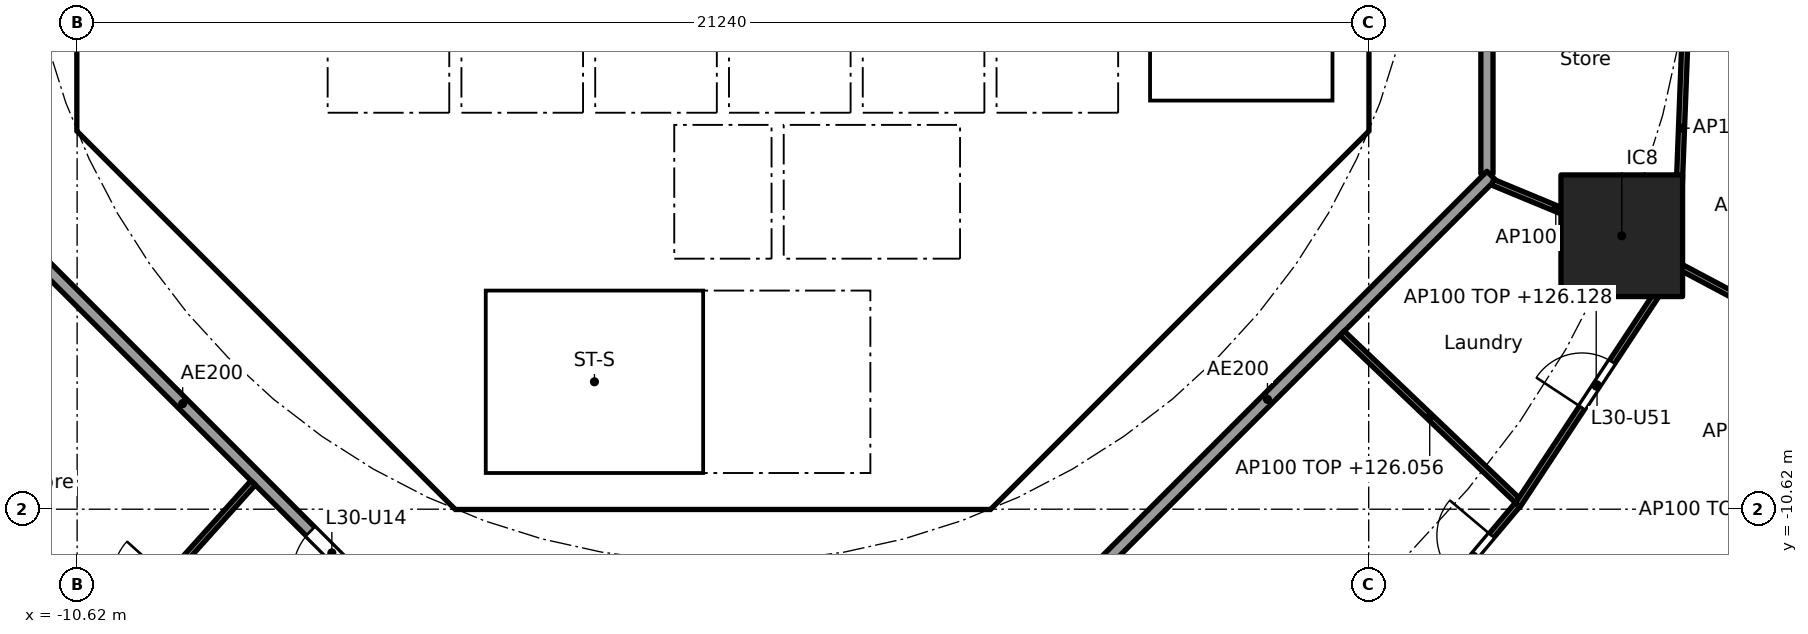
"""IFC4 building model, lengths in metres.
Left out: names, types, materials, properties, quantities, classifications, styles, units other than length and angle.
Written with IfcOpenShell. Run it as: python <this file> out.ifc"""

import sys

from ifc_helpers import new_model, si_unit, direction, frame, frame_2d, origin, origin_2d, place, context, subcontext, project, spatial, polyline, rectangle, outline, extrude, element, fill, save


model = new_model("IFC4")
c1 = context("Model", 3, precision=1e-05, world=origin(), true_north=direction((0.0, 1.0)))
c2 = subcontext(c1, "Body", "Model", "MODEL_VIEW")
j1 = project(units=[si_unit("LENGTHUNIT", "METRE"), si_unit("PLANEANGLEUNIT", "RADIAN")], contexts=[c1])
p1 = place(None, origin())
s1 = spatial("IfcSite", under=j1, at=p1, CompositionType="ELEMENT")
p2 = place(p1, origin())
s2 = spatial("IfcBuilding", under=s1, at=p2, CompositionType="ELEMENT")
p3 = place(p2, frame((0.0, 0.0, 123.3)))
s3 = spatial("IfcBuildingStorey", under=s2, at=p3, CompositionType="ELEMENT", Elevation=123.3)
p4 = place(p3, frame((14.782, -6.123, 0.0), z_axis=(0.0, 0.0, 1.0), x_axis=(1.0, 0.0, 0.0)))
e1 = element("IfcColumn", 1, at=p4, inside=s3, PredefinedType="COLUMN", context=c2, shape_type="SweptSolid", body=[
    extrude(rectangle(XDim=2.0, YDim=2.0, at=origin_2d()), origin(), (0.0, 0.0, 1.0), 3.7),
])
p5 = place(p3, frame((-10.325, 3.801, 0.0), z_axis=(0.0, 0.0, 1.0), x_axis=(0.0, -1.0, 0.0)))
e2 = element("IfcWall", 2, at=p5, inside=s3, PredefinedType="SHEAR", context=c2, shape_type="SweptSolid", body=[
    extrude(rectangle(XDim=7.602, YDim=0.6, at=frame_2d((3.801, 0.0))), origin(), (0.0, 0.0, 1.0), 3.44),
])
p6 = place(p5, frame((0.651, 0.0, 0.0)))
e3 = element("IfcOpeningElement", 3, at=p6, cuts=e2, PredefinedType="OPENING", context=c2, shape_type="SweptSolid", body=[
    extrude(rectangle(XDim=1.5, YDim=2.1, at=frame_2d((0.75, 1.05))), frame((0.0, 0.31, 0.0), z_axis=(0.0, -1.0, 0.0), x_axis=(1.0, 0.0, 0.0)), (0.0, 0.0, 1.0), 0.62),
])
p7 = place(p5, frame((5.451, 0.0, 0.0)))
e4 = element("IfcOpeningElement", 4, at=p7, cuts=e2, PredefinedType="OPENING", context=c2, shape_type="SweptSolid", body=[
    extrude(rectangle(XDim=1.5, YDim=2.1, at=frame_2d((0.75, 1.05))), frame((0.0, 0.31, 0.0), z_axis=(0.0, -1.0, 0.0), x_axis=(1.0, 0.0, 0.0)), (0.0, 0.0, 1.0), 0.62),
])
p8 = place(p3, frame((-9.988, -4.613, 0.0), z_axis=(0.0, 0.0, 1.0), x_axis=(0.707106781187, -0.707106781187, 0.0)))
e5 = element("IfcWall", 5, at=p8, inside=s3, PredefinedType="SHEAR", context=c2, shape_type="SweptSolid", body=[
    extrude(rectangle(XDim=7.602, YDim=0.6, at=frame_2d((3.801, 0.0))), origin(), (0.0, 0.0, 1.0), 3.44),
])
p9 = place(p8, frame((6.151, 0.0, 0.0)))
e6 = element("IfcOpeningElement", 6, at=p9, cuts=e5, PredefinedType="OPENING", context=c2, shape_type="SweptSolid", body=[
    extrude(rectangle(XDim=1.1, YDim=2.1, at=frame_2d((0.55, 1.05))), frame((0.0, 0.31, 0.0), z_axis=(0.0, -1.0, 0.0), x_axis=(1.0, 0.0, 0.0)), (0.0, 0.0, 1.0), 0.62),
])
p10 = place(p3, frame((4.613, -9.988, 0.0), z_axis=(0.0, 0.0, 1.0), x_axis=(0.707106781187, 0.707106781187, 0.0)))
e7 = element("IfcWall", 7, at=p10, inside=s3, PredefinedType="SHEAR", context=c2, shape_type="SweptSolid", body=[
    extrude(rectangle(XDim=7.602, YDim=0.6, at=frame_2d((3.801, 0.0))), origin(), (0.0, 0.0, 1.0), 3.44),
])
p11 = place(p10, frame((3.201, 0.0, 0.0)))
e8 = element("IfcOpeningElement", 8, at=p11, cuts=e7, PredefinedType="OPENING", context=c2, shape_type="SweptSolid", body=[
    extrude(rectangle(XDim=1.2, YDim=2.1, at=frame_2d((0.6, 1.05))), frame((0.0, 0.31, 0.0), z_axis=(0.0, -1.0, 0.0), x_axis=(1.0, 0.0, 0.0)), (0.0, 0.0, 1.0), 0.62),
])
p12 = place(p3, frame((4.0, -10.025, 0.0), z_axis=(0.0, 0.0, 1.0), x_axis=(0.0, 1.0, 0.0)))
e9 = element("IfcWall", 9, at=p12, inside=s3, PredefinedType="SOLIDWALL", context=c2, shape_type="SweptSolid", body=[
    extrude(rectangle(XDim=3.0, YDim=0.2, at=frame_2d((1.5, 0.0))), origin(), (0.0, 0.0, 1.0), 3.44),
])
p13 = place(p12, frame((0.975, 0.0, 0.0)))
e10 = element("IfcOpeningElement", 10, at=p13, cuts=e9, PredefinedType="OPENING", context=c2, shape_type="SweptSolid", body=[
    extrude(rectangle(XDim=1.1, YDim=2.1, at=frame_2d((0.55, 1.05))), frame((0.0, 0.11, 0.0), z_axis=(0.0, -1.0, 0.0), x_axis=(1.0, 0.0, 0.0)), (0.0, 0.0, 1.0), 0.22),
])
p14 = place(p3, frame((-5.8, -8.227, 0.0), z_axis=(0.0, 0.0, 1.0), x_axis=(0.0, 1.0, 0.0)))
e11 = element("IfcWall", 11, at=p14, inside=s3, PredefinedType="PARTITIONING", context=c2, shape_type="SweptSolid", body=[
    extrude(rectangle(XDim=3.927, YDim=0.15, at=frame_2d((1.963, 0.0))), origin(), (0.0, 0.0, 1.0), 3.44),
])
p15 = place(p14, frame((1.476, 0.0, 0.0)))
e12 = element("IfcOpeningElement", 12, at=p15, cuts=e11, PredefinedType="OPENING", context=c2, shape_type="SweptSolid", body=[
    extrude(rectangle(XDim=0.9, YDim=2.1, at=frame_2d((0.45, 1.05))), frame((0.0, 0.085, 0.0), z_axis=(0.0, -1.0, 0.0), x_axis=(1.0, 0.0, 0.0)), (0.0, 0.0, 1.0), 0.17),
])
p16 = place(p3, frame((4.0, -6.5, 0.0), z_axis=(0.0, 0.0, 1.0), x_axis=(0.0, 1.0, 0.0)))
e13 = element("IfcWall", 13, at=p16, inside=s3, PredefinedType="SOLIDWALL", context=c2, shape_type="SweptSolid", body=[
    extrude(rectangle(XDim=2.2, YDim=0.2, at=frame_2d((1.1, 0.0))), origin(), (0.0, 0.0, 1.0), 3.44),
])
p17 = place(p16, frame((0.55, 0.0, 0.0)))
e14 = element("IfcOpeningElement", 14, at=p17, cuts=e13, PredefinedType="OPENING", context=c2, shape_type="SweptSolid", body=[
    extrude(rectangle(XDim=1.1, YDim=2.1, at=frame_2d((0.55, 1.05))), frame((0.0, 0.11, 0.0), z_axis=(0.0, -1.0, 0.0), x_axis=(1.0, 0.0, 0.0)), (0.0, 0.0, 1.0), 0.22),
])
p18 = place(p3, frame((-4.0, -6.5, 0.0), z_axis=(0.0, 0.0, 1.0), x_axis=(0.0, 1.0, 0.0)))
e15 = element("IfcWall", 15, at=p18, inside=s3, PredefinedType="SOLIDWALL", context=c2, shape_type="SweptSolid", body=[
    extrude(rectangle(XDim=2.2, YDim=0.2, at=frame_2d((1.1, 0.0))), origin(), (0.0, 0.0, 1.0), 3.44),
])
p19 = place(p18, frame((0.65, 0.0, 0.0)))
e16 = element("IfcOpeningElement", 16, at=p19, cuts=e15, PredefinedType="OPENING", context=c2, shape_type="SweptSolid", body=[
    extrude(rectangle(XDim=0.9, YDim=2.1, at=frame_2d((0.45, 1.05))), frame((0.0, 0.11, 0.0), z_axis=(0.0, -1.0, 0.0), x_axis=(1.0, 0.0, 0.0)), (0.0, 0.0, 1.0), 0.22),
])
p20 = place(p3, origin())
e17 = element("IfcWall", 17, at=p20, inside=s3, PredefinedType="SHEAR", context=c2, shape_type="SweptSolid", body=[
    extrude(outline(polyline([(-10.625, -3.801), (-10.025, -3.801), (-10.025, -4.152), (-9.776, -4.401), (-10.2, -4.825), (-10.625, -4.401), (-10.625, -3.801)])), origin(), (0.0, 0.0, 1.0), 3.44),
])
p21 = place(p3, origin())
e18 = element("IfcWall", 18, at=p21, inside=s3, PredefinedType="SHEAR", context=c2, shape_type="SweptSolid", body=[
    extrude(outline(polyline([(-4.152, -10.025), (4.152, -10.025), (4.401, -9.776), (4.825, -10.2), (4.401, -10.625), (-4.401, -10.625), (-4.825, -10.2), (-4.401, -9.776), (-4.152, -10.025)])), origin(), (0.0, 0.0, 1.0), 3.44),
])
p22 = place(p3, origin())
e19 = element("IfcWall", 19, at=p22, inside=s3, PredefinedType="SHEAR", context=c2, shape_type="SweptSolid", body=[
    extrude(outline(polyline([(9.776, -4.401), (10.025, -4.152), (10.025, -3.801), (10.025, 4.152), (9.776, 4.401), (10.2, 4.825), (10.625, 4.401), (10.625, -4.401), (10.2, -4.825), (9.776, -4.401)])), origin(), (0.0, 0.0, 1.0), 3.44),
])
for number, where, z_axis, x_axis in (
    (20, (-0.9, -6.5, 0.0), (0.0, 0.0, 1.0), (0.0, 1.0, 0.0)),
    (21, (0.9, -6.5, 0.0), (0.0, 0.0, 1.0), (0.0, 1.0, 0.0)),
):
    element("IfcWall", number, at=place(p3, frame(where, z_axis=z_axis, x_axis=x_axis)), inside=s3, PredefinedType="SOLIDWALL", context=c2, shape_type="SweptSolid", body=[
        extrude(rectangle(XDim=2.2, YDim=0.2, at=frame_2d((1.1, 0.0))), origin(), (0.0, 0.0, 1.0), 3.44),
    ])
p23 = place(p3, origin())
e22 = element("IfcWall", 22, at=p23, inside=s3, PredefinedType="SOLIDWALL", context=c2, shape_type="SweptSolid", body=[
    extrude(outline(polyline([(-6.7, -2.1), (-6.5, -2.1), (-6.5, -4.1), (-4.5, -4.1), (-4.5, -2.1), (-4.3, -2.1), (-4.3, -4.1), (-2.3, -4.1), (-2.3, -2.1), (-2.1, -2.1), (-2.1, -4.1), (-0.1, -4.1), (-0.1, -2.1), (0.1, -2.1), (0.1, -4.1), (2.1, -4.1), (2.1, -2.1), (2.3, -2.1), (2.3, -4.1), (4.3, -4.1), (4.3, -2.1), (4.5, -2.1), (4.5, -4.1), (6.5, -4.1), (6.5, -2.1), (6.7, -2.1), (6.7, -4.3), (-6.7, -4.3), (-6.7, -2.1)])), origin(), (0.0, 0.0, 1.0), 3.44),
])
p24 = place(p3, frame((-10.025, -4.0, 0.0), z_axis=(0.0, 0.0, 1.0), x_axis=(1.0, 0.0, 0.0)))
e23 = element("IfcWall", 23, at=p24, inside=s3, PredefinedType="PARTITIONING", context=c2, shape_type="SweptSolid", body=[
    extrude(rectangle(XDim=3.325, YDim=0.2, at=frame_2d((1.662, 0.0))), origin(), (0.0, 0.0, 1.0), 3.44),
])
p25 = place(p3, origin())
e24 = element("IfcWall", 24, at=p25, inside=s3, PredefinedType="SOLIDWALL", context=c2, shape_type="SweptSolid", body=[
    extrude(outline(polyline([(-3.9, -10.025), (-4.1, -10.025), (-4.1, -7.025), (-3.9, -7.025), (-3.9, -10.025)])), origin(), (0.0, 0.0, 1.0), 3.44),
])
p26 = place(p3, origin())
e25 = element("IfcWall", 25, at=p26, inside=s3, PredefinedType="SOLIDWALL", context=c2, shape_type="SweptSolid", body=[
    extrude(outline(polyline([(4.1, -7.025), (-4.1, -7.025), (-4.1, -6.5), (4.1, -6.5), (4.1, -7.025)])), origin(), (0.0, 0.0, 1.0), 3.44),
])
p27 = place(p3, origin())
e26 = element("IfcWall", 26, at=p27, inside=s3, PredefinedType="SOLIDWALL", context=c2, shape_type="SweptSolid", body=[
    extrude(outline(polyline([(7.025, -3.9), (6.7, -3.9), (6.7, 3.9), (7.025, 3.9), (7.025, -3.9)])), origin(), (0.0, 0.0, 1.0), 3.44),
])
p28 = place(p3, origin())
e27 = element("IfcWall", 27, at=p28, inside=s3, PredefinedType="SOLIDWALL", context=c2, shape_type="SweptSolid", body=[
    extrude(outline(polyline([(10.025, -4.1), (6.7, -4.1), (6.7, -3.9), (10.025, -3.9), (10.025, -4.1)])), origin(), (0.0, 0.0, 1.0), 3.44),
])
p29 = place(p3, frame((12.565, -5.104, 0.0), z_axis=(0.0, 0.0, 1.0), x_axis=(0.0, 1.0, 0.0)))
e28 = element("IfcWall", 28, at=p29, inside=s3, PredefinedType="PARTITIONING", context=c2, shape_type="SweptSolid", body=[
    extrude(rectangle(XDim=10.209, YDim=0.2, at=frame_2d((5.104, 0.0))), origin(), (0.0, 0.0, 1.0), 3.44),
])
p30 = place(p3, frame((-12.635, -5.134, 0.0), z_axis=(0.0, 0.0, 1.0), x_axis=(0.707106781187, -0.707106781187, 0.0)))
e29 = element("IfcWall", 29, at=p30, inside=s3, PredefinedType="PARTITIONING", context=c2, shape_type="SweptSolid", body=[
    extrude(rectangle(XDim=10.609, YDim=0.2, at=frame_2d((5.305, 0.0))), origin(), (0.0, 0.0, 1.0), 3.44),
])
p31 = place(p30, frame((8.274, 0.0, 0.0)))
e30 = element("IfcOpeningElement", 30, at=p31, cuts=e29, PredefinedType="OPENING", context=c2, shape_type="SweptSolid", body=[
    extrude(rectangle(XDim=1.0, YDim=2.1, at=frame_2d((0.5, 1.05))), frame((0.0, 0.11, 0.0), z_axis=(0.0, -1.0, 0.0), x_axis=(1.0, 0.0, 0.0)), (0.0, 0.0, 1.0), 0.22),
])
p32 = place(p3, frame((5.275, -12.494, 0.0), z_axis=(0.0, 0.0, 1.0), x_axis=(0.707106781187, 0.707106781187, 0.0)))
e31 = element("IfcWall", 31, at=p32, inside=s3, PredefinedType="PARTITIONING", context=c2, shape_type="SweptSolid", body=[
    extrude(rectangle(XDim=10.409, YDim=0.2, at=frame_2d((5.205, 0.0))), origin(), (0.0, 0.0, 1.0), 3.44),
])
p33 = place(p3, frame((15.849, -2.158, 0.0), z_axis=(0.0, 0.0, 1.0), x_axis=(-0.038390448414, -0.999262815014, 0.0)))
e32 = element("IfcWall", 32, at=p33, inside=s3, PredefinedType="PARTITIONING", context=c2, shape_type="SweptSolid", body=[
    extrude(rectangle(XDim=4.394, YDim=0.1, at=frame_2d((2.197, 0.0))), origin(), (0.0, 0.0, 1.0), 3.44),
])
p34 = place(p3, frame((-7.725, -10.186, 0.0), z_axis=(0.0, 0.0, 1.0), x_axis=(-0.668498346565, -0.743713628112, 0.0)))
e33 = element("IfcWall", 33, at=p34, inside=s3, PredefinedType="PARTITIONING", context=c2, shape_type="SweptSolid", body=[
    extrude(rectangle(XDim=11.919, YDim=0.1, at=frame_2d((5.959, 0.0))), origin(), (0.0, 0.0, 1.0), 2.756),
])
p35 = place(p34, frame((2.106, 0.0, 0.0)))
e34 = element("IfcOpeningElement", 34, at=p35, cuts=e33, PredefinedType="OPENING", context=c2, shape_type="SweptSolid", body=[
    extrude(rectangle(XDim=0.9, YDim=2.1, at=frame_2d((0.45, 1.05))), frame((0.0, 0.06, 0.0), z_axis=(0.0, -1.0, 0.0), x_axis=(1.0, 0.0, 0.0)), (0.0, 0.0, 1.0), 0.12),
])
p36 = place(p34, frame((8.041, 0.0, 0.0)))
e35 = element("IfcOpeningElement", 35, at=p36, cuts=e33, PredefinedType="OPENING", context=c2, shape_type="SweptSolid", body=[
    extrude(rectangle(XDim=0.9, YDim=2.1, at=frame_2d((0.45, 1.05))), frame((0.0, 0.06, 0.0), z_axis=(0.0, -1.0, 0.0), x_axis=(1.0, 0.0, 0.0)), (0.0, 0.0, 1.0), 0.12),
])
p37 = place(p3, frame((10.138, -14.026, 0.0), z_axis=(0.0, 0.0, 1.0), x_axis=(0.644051444483, 0.764982180746, 0.0)))
e36 = element("IfcWall", 36, at=p37, inside=s3, PredefinedType="PARTITIONING", context=c2, shape_type="SweptSolid", body=[
    extrude(rectangle(XDim=4.548, YDim=0.1, at=frame_2d((2.274, 0.0))), origin(), (0.0, 0.0, 1.0), 2.828),
])
p38 = place(p37, frame((2.986, 0.0, 0.0)))
e37 = element("IfcOpeningElement", 37, at=p38, cuts=e36, PredefinedType="OPENING", context=c2, shape_type="SweptSolid", body=[
    extrude(rectangle(XDim=0.9, YDim=2.1, at=frame_2d((0.45, 1.05))), frame((0.0, 0.06, 0.0), z_axis=(0.0, -1.0, 0.0), x_axis=(1.0, 0.0, 0.0)), (0.0, 0.0, 1.0), 0.12),
])
p39 = place(p3, frame((10.184, -7.727, 0.0), z_axis=(0.0, 0.0, 1.0), x_axis=(0.723654892782, -0.690162007179, 0.0)))
e38 = element("IfcWall", 38, at=p39, inside=s3, PredefinedType="PARTITIONING", context=c2, shape_type="SweptSolid", body=[
    extrude(rectangle(XDim=3.98, YDim=0.1, at=frame_2d((1.99, 0.0))), origin(), (0.0, 0.0, 1.0), 2.756),
])
p40 = place(p3, frame((13.072, -10.55, 0.0), z_axis=(0.0, 0.0, 1.0), x_axis=(0.550614843759, 0.834759422727, 0.0)))
e39 = element("IfcWall", 39, at=p40, inside=s3, PredefinedType="PARTITIONING", context=c2, shape_type="SweptSolid", body=[
    extrude(rectangle(XDim=4.683, YDim=0.1, at=frame_2d((2.341, 0.0))), origin(), (0.0, 0.0, 1.0), 2.828),
])
p41 = place(p40, frame((1.917, 0.0, 0.0)))
e40 = element("IfcOpeningElement", 40, at=p41, cuts=e39, PredefinedType="OPENING", context=c2, shape_type="SweptSolid", body=[
    extrude(rectangle(XDim=0.9, YDim=2.1, at=frame_2d((0.45, 1.05))), frame((0.0, 0.06, 0.0), z_axis=(0.0, -1.0, 0.0), x_axis=(1.0, 0.0, 0.0)), (0.0, 0.0, 1.0), 0.12),
])
p42 = place(p3, frame((12.657, -5.243, 0.0), z_axis=(0.0, 0.0, 1.0), x_axis=(0.923864733477, -0.382719158442, 0.0)))
e41 = element("IfcWall", 41, at=p42, inside=s3, PredefinedType="PARTITIONING", context=c2, shape_type="SweptSolid", body=[
    extrude(rectangle(XDim=2.25, YDim=0.1, at=frame_2d((1.125, 0.0))), origin(), (0.0, 0.0, 1.0), 3.44),
])
p43 = place(p3, frame((14.826, -6.146, 0.0), z_axis=(0.0, 0.0, 1.0), x_axis=(0.883012998471, -0.469348532044, 0.0)))
e42 = element("IfcWall", 42, at=p43, inside=s3, PredefinedType="PARTITIONING", context=c2, shape_type="SweptSolid", body=[
    extrude(rectangle(XDim=9.172, YDim=0.1, at=frame_2d((4.586, 0.0))), origin(), (0.0, 0.0, 1.0), 2.828),
])
p44 = place(p43, frame((2.728, 0.0, 0.0)))
e43 = element("IfcOpeningElement", 43, at=p44, cuts=e42, PredefinedType="OPENING", context=c2, shape_type="SweptSolid", body=[
    extrude(rectangle(XDim=0.9, YDim=2.1, at=frame_2d((0.45, 1.05))), frame((0.0, 0.06, 0.0), z_axis=(0.0, -1.0, 0.0), x_axis=(1.0, 0.0, 0.0)), (0.0, 0.0, 1.0), 0.12),
])
p45 = place(p17, origin())
e44 = element("IfcDoor", 44, at=p45, inside=s3, OperationType="DOUBLE_DOOR_SLIDING", PredefinedType="DOOR", context=c2, shape_type="SweptSolid", body=[
    extrude(rectangle(XDim=1.1, YDim=2.1, at=frame_2d((0.55, 1.05))), frame((0.0, 0.025, 0.0), z_axis=(0.0, -1.0, 0.0), x_axis=(1.0, 0.0, 0.0)), (0.0, 0.0, 1.0), 0.05),
])
fill(e14, e44)
p46 = place(p13, origin())
e45 = element("IfcDoor", 45, at=p46, inside=s3, OperationType="SINGLE_SWING_LEFT", PredefinedType="DOOR", context=c2, shape_type="SweptSolid", body=[
    extrude(rectangle(XDim=1.1, YDim=2.1, at=frame_2d((0.55, 1.05))), frame((0.0, 0.025, 0.0), z_axis=(0.0, -1.0, 0.0), x_axis=(1.0, 0.0, 0.0)), (0.0, 0.0, 1.0), 0.05),
])
fill(e10, e45)
p47 = place(p15, origin())
e46 = element("IfcDoor", 46, at=p47, inside=s3, OperationType="SINGLE_SWING_LEFT", PredefinedType="DOOR", context=c2, shape_type="SweptSolid", body=[
    extrude(rectangle(XDim=0.9, YDim=2.1, at=frame_2d((0.45, 1.05))), frame((0.0, 0.025, 0.0), z_axis=(0.0, -1.0, 0.0), x_axis=(1.0, 0.0, 0.0)), (0.0, 0.0, 1.0), 0.05),
])
fill(e12, e46)
p48 = place(p19, frame((0.9, 0.0, 0.0), x_axis=(-1.0, 0.0, 0.0)))
e47 = element("IfcDoor", 47, at=p48, inside=s3, OperationType="SINGLE_SWING_RIGHT", PredefinedType="DOOR", context=c2, shape_type="SweptSolid", body=[
    extrude(rectangle(XDim=0.9, YDim=2.1, at=frame_2d((0.45, 1.05))), frame((0.0, 0.025, 0.0), z_axis=(0.0, -1.0, 0.0), x_axis=(1.0, 0.0, 0.0)), (0.0, 0.0, 1.0), 0.05),
])
fill(e16, e47)
p49 = place(p11, origin())
e48 = element("IfcDoor", 48, at=p49, inside=s3, OperationType="SINGLE_SWING_RIGHT", PredefinedType="DOOR", context=c2, shape_type="SweptSolid", body=[
    extrude(rectangle(XDim=1.2, YDim=2.1, at=frame_2d((0.6, 1.05))), frame((0.0, 0.025, 0.0), z_axis=(0.0, -1.0, 0.0), x_axis=(1.0, 0.0, 0.0)), (0.0, 0.0, 1.0), 0.05),
])
fill(e8, e48)
p50 = place(p7, origin())
e49 = element("IfcDoor", 49, at=p50, inside=s3, OperationType="DOUBLE_DOOR_SINGLE_SWING", PredefinedType="DOOR", context=c2, shape_type="SweptSolid", body=[
    extrude(rectangle(XDim=1.5, YDim=2.1, at=frame_2d((0.75, 1.05))), frame((0.0, 0.025, 0.0), z_axis=(0.0, -1.0, 0.0), x_axis=(1.0, 0.0, 0.0)), (0.0, 0.0, 1.0), 0.05),
])
fill(e4, e49)
p51 = place(p9, origin())
e50 = element("IfcDoor", 50, at=p51, inside=s3, OperationType="SINGLE_SWING_RIGHT", PredefinedType="DOOR", context=c2, shape_type="SweptSolid", body=[
    extrude(rectangle(XDim=1.1, YDim=2.1, at=frame_2d((0.55, 1.05))), frame((0.0, 0.025, 0.0), z_axis=(0.0, -1.0, 0.0), x_axis=(1.0, 0.0, 0.0)), (0.0, 0.0, 1.0), 0.05),
])
fill(e6, e50)
p52 = place(p31, frame((1.0, 0.0, 0.0), x_axis=(-1.0, 0.0, 0.0)))
e51 = element("IfcDoor", 51, at=p52, inside=s3, OperationType="SINGLE_SWING_LEFT", PredefinedType="DOOR", context=c2, shape_type="SweptSolid", body=[
    extrude(rectangle(XDim=1.0, YDim=2.1, at=frame_2d((0.5, 1.05))), frame((0.0, 0.025, 0.0), z_axis=(0.0, -1.0, 0.0), x_axis=(1.0, 0.0, 0.0)), (0.0, 0.0, 1.0), 0.05),
])
fill(e30, e51)
p53 = place(p38, origin())
e52 = element("IfcDoor", 52, at=p53, inside=s3, OperationType="SINGLE_SWING_RIGHT", PredefinedType="DOOR", context=c2, shape_type="SweptSolid", body=[
    extrude(rectangle(XDim=0.9, YDim=2.1, at=frame_2d((0.45, 1.05))), frame((0.0, 0.025, 0.0), z_axis=(0.0, -1.0, 0.0), x_axis=(1.0, 0.0, 0.0)), (0.0, 0.0, 1.0), 0.05),
])
fill(e37, e52)
p54 = place(p41, origin())
e53 = element("IfcDoor", 53, at=p54, inside=s3, OperationType="SINGLE_SWING_LEFT", PredefinedType="DOOR", context=c2, shape_type="SweptSolid", body=[
    extrude(rectangle(XDim=0.9, YDim=2.1, at=frame_2d((0.45, 1.05))), frame((0.0, 0.025, 0.0), z_axis=(0.0, -1.0, 0.0), x_axis=(1.0, 0.0, 0.0)), (0.0, 0.0, 1.0), 0.05),
])
fill(e40, e53)
save(model, sys.argv[1])
